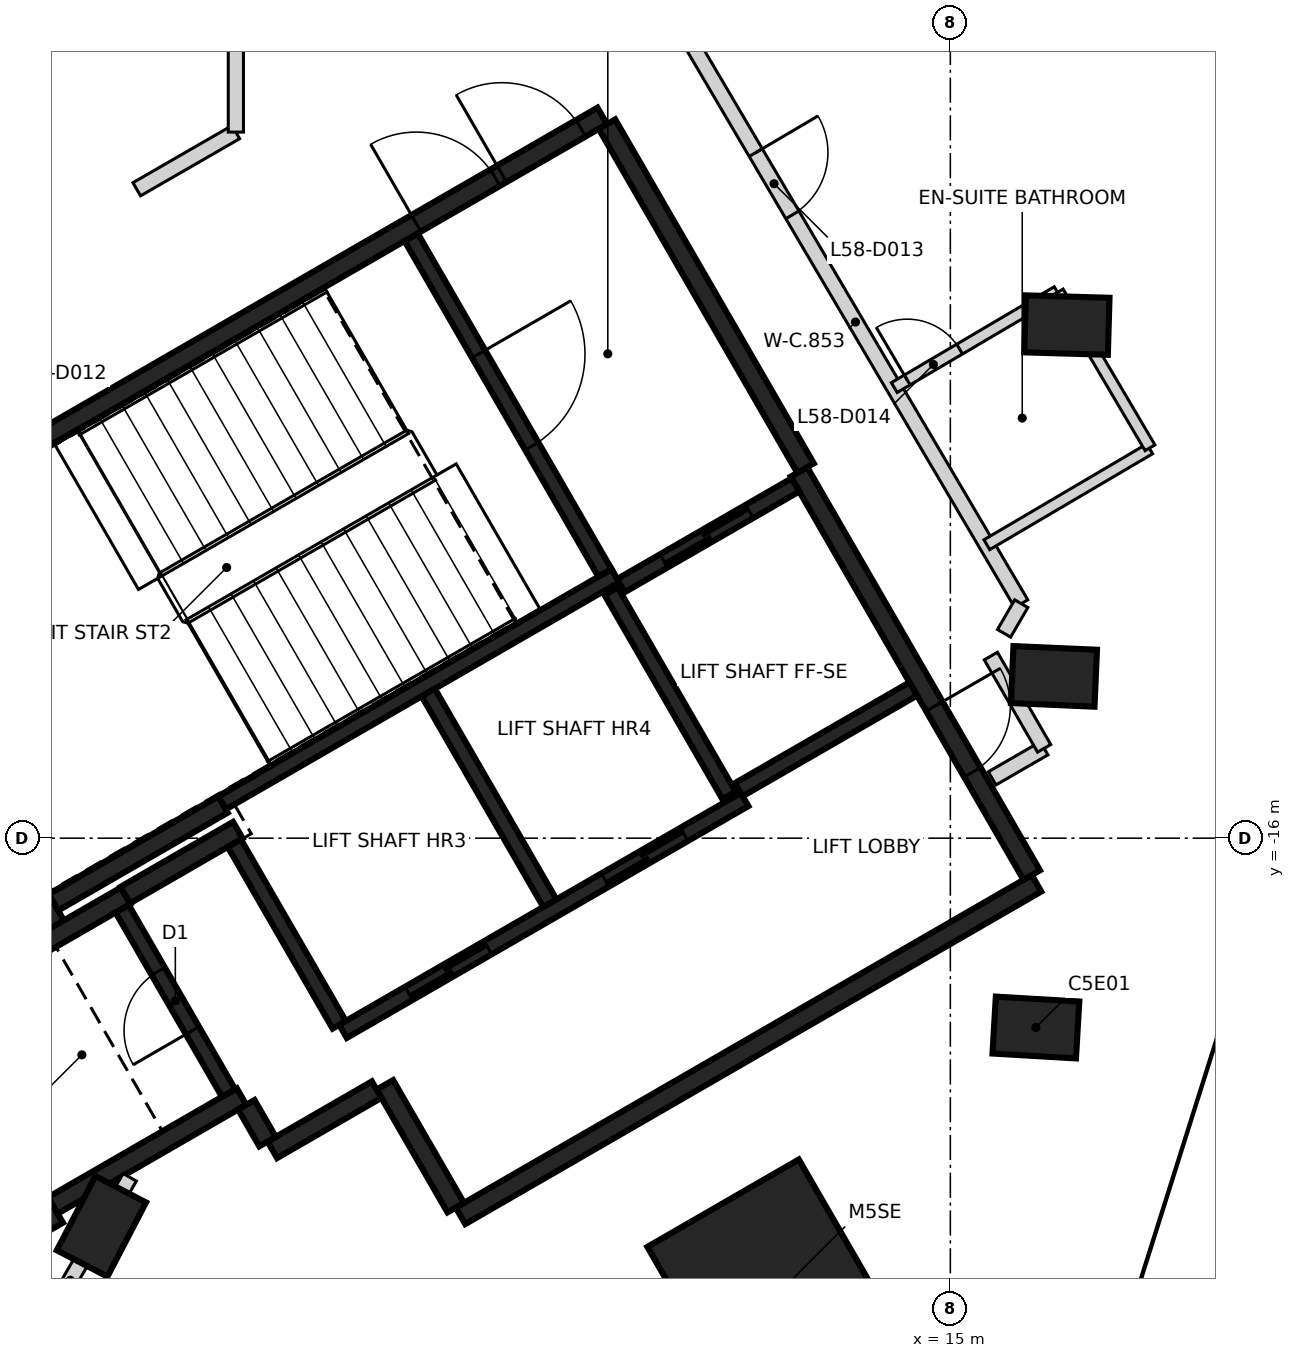
"""IFC4 building model, lengths in metres.
Left out: names, types, materials, properties, quantities, classifications, styles, units other than length and angle.
Written with IfcOpenShell. Run it as: python <this file> out.ifc"""

import sys

from ifc_helpers import new_model, si_unit, direction, frame, frame_2d, origin, origin_2d, place, context, subcontext, project, spatial, rectangle, extrude, element, fill, save


model = new_model("IFC4")
c1 = context("Model", 3, precision=1e-05, world=origin(), true_north=direction((0.0, 1.0)))
c2 = subcontext(c1, "Body", "Model", "MODEL_VIEW")
j1 = project(units=[si_unit("LENGTHUNIT", "METRE"), si_unit("PLANEANGLEUNIT", "RADIAN")], contexts=[c1])
p1 = place(None, origin())
s1 = spatial("IfcSite", under=j1, at=p1, CompositionType="ELEMENT")
p2 = place(p1, origin())
s2 = spatial("IfcBuilding", under=s1, at=p2, CompositionType="ELEMENT")
p3 = place(p2, frame((0.0, 0.0, 232.2)))
s3 = spatial("IfcBuildingStorey", under=s2, at=p3, CompositionType="ELEMENT", Elevation=232.2)
for number, where, z_axis, x_axis in (
    (1, (16.125, -18.491, -0.35), (0.0, 0.0, 1.0), (-0.998, 0.058, 0.0)),
    (2, (16.363, -13.872, -0.35), (0.0, 0.0, 1.0), (-0.999, 0.044, 0.0)),
    (3, (16.533, -9.25, -0.35), (0.0, 0.0, 1.0), (-1.0, 0.029, 0.0)),
    (4, (3.832, -21.107, -0.35), (0.0, 0.0, 1.0), (0.461, 0.887, 0.0)),
):
    element("IfcColumn", number, at=place(p3, frame(where, z_axis=z_axis, x_axis=x_axis)), inside=s3, PredefinedType="COLUMN", context=c2, shape_type="SweptSolid", body=[
        extrude(rectangle(XDim=1.1, YDim=0.75, at=origin_2d()), origin(), (0.0, 0.0, 1.0), 3.6),
    ])
p4 = place(p3, frame((12.71, -22.015, -0.35), z_axis=(0.0, 0.0, 1.0), x_axis=(-0.5, 0.866025403784, 0.0)))
e5 = element("IfcColumn", 5, at=p4, inside=s3, PredefinedType="COLUMN", context=c2, shape_type="SweptSolid", body=[
    extrude(rectangle(XDim=2.8, YDim=2.3, at=origin_2d()), origin(), (0.0, 0.0, 1.0), 3.6),
])
p5 = place(p3, frame((0.417, -12.273, 0.0), z_axis=(0.0, 0.0, 1.0), x_axis=(0.866021906294, 0.500006057782, 0.0)))
e6 = element("IfcWall", 6, at=p5, inside=s3, PredefinedType="SHEAR", context=c2, shape_type="SweptSolid", body=[
    extrude(rectangle(XDim=11.55, YDim=0.25, at=frame_2d((5.775, 0.0))), origin(), (0.0, 0.0, 1.0), 3.25),
])
p6 = place(p5, frame((10.025, 0.0, 0.0)))
e7 = element("IfcOpeningElement", 7, at=p6, cuts=e6, PredefinedType="OPENING", context=c2, shape_type="SweptSolid", body=[
    extrude(rectangle(XDim=1.2, YDim=2.1, at=frame_2d((0.6, 1.05))), frame((0.0, 0.135, 0.0), z_axis=(0.0, -1.0, 0.0), x_axis=(1.0, 0.0, 0.0)), (0.0, 0.0, 1.0), 0.27),
])
p7 = place(p5, frame((8.725, 0.0, 0.0)))
e8 = element("IfcOpeningElement", 8, at=p7, cuts=e6, PredefinedType="OPENING", context=c2, shape_type="SweptSolid", body=[
    extrude(rectangle(XDim=1.2, YDim=2.1, at=frame_2d((0.6, 1.05))), frame((0.0, 0.135, 0.0), z_axis=(0.0, -1.0, 0.0), x_axis=(1.0, 0.0, 0.0)), (0.0, 0.0, 1.0), 0.27),
])
p8 = place(p3, frame((16.133, -16.594, 0.0), z_axis=(0.0, 0.0, 1.0), x_axis=(-0.866022959057, -0.500004234368, 0.0)))
e9 = element("IfcWall", 9, at=p8, inside=s3, PredefinedType="SHEAR", context=c2, shape_type="SweptSolid", body=[
    extrude(rectangle(XDim=8.75, YDim=0.25, at=frame_2d((4.375, 0.0))), origin(), (0.0, 0.0, 1.0), 3.25),
])
p9 = place(p3, frame((13.008, -11.181, 0.0), z_axis=(0.0, 0.0, 1.0), x_axis=(0.500001955336, -0.866024274868, 0.0)))
e10 = element("IfcWall", 10, at=p9, inside=s3, PredefinedType="SHEAR", context=c2, shape_type="SweptSolid", body=[
    extrude(rectangle(XDim=6.125, YDim=0.25, at=frame_2d((3.062, 0.0))), origin(), (0.0, 0.0, 1.0), 3.25),
])
p10 = place(p9, frame((3.563, 0.0, 0.0)))
e11 = element("IfcOpeningElement", 11, at=p10, cuts=e10, PredefinedType="OPENING", context=c2, shape_type="SweptSolid", body=[
    extrude(rectangle(XDim=1.0, YDim=2.1, at=frame_2d((0.5, 1.05))), frame((0.0, 0.135, 0.0), z_axis=(0.0, -1.0, 0.0), x_axis=(1.0, 0.0, 0.0)), (0.0, 0.0, 1.0), 0.27),
])
p11 = place(p3, frame((3.235, -17.153, 0.0), z_axis=(0.0, 0.0, 1.0), x_axis=(-0.500008851346, 0.866020293397, 0.0)))
e12 = element("IfcWall", 12, at=p11, inside=s3, PredefinedType="SHEAR", context=c2, shape_type="SweptSolid", body=[
    extrude(rectangle(XDim=5.51, YDim=0.25, at=frame_2d((2.755, 0.0))), origin(), (0.0, 0.0, 1.0), 3.25),
])
p12 = place(p3, frame((10.483, -6.606, 0.0), z_axis=(0.0, 0.0, 1.0), x_axis=(0.49999885962, -0.866026062182, 0.0)))
e13 = element("IfcWall", 13, at=p12, inside=s3, PredefinedType="SHEAR", context=c2, shape_type="SweptSolid", body=[
    extrude(rectangle(XDim=5.225, YDim=0.25, at=frame_2d((2.612, 0.0))), origin(), (0.0, 0.0, 1.0), 3.25),
])
p13 = place(p3, frame((3.217, -21.122, 0.0), z_axis=(0.0, 0.0, 1.0), x_axis=(-0.499998874531, 0.866026053573, 0.0)))
e14 = element("IfcWall", 14, at=p13, inside=s3, PredefinedType="SHEAR", context=c2, shape_type="SweptSolid", body=[
    extrude(rectangle(XDim=3.313, YDim=0.25, at=frame_2d((1.656, 0.0))), origin(), (0.0, 0.0, 1.0), 3.25),
])
p14 = place(p3, frame((1.669, -18.19, 0.0), z_axis=(0.0, 0.0, 1.0), x_axis=(0.866042235819, 0.499970844928, 0.0)))
e15 = element("IfcWall", 15, at=p14, inside=s3, PredefinedType="SHEAR", context=c2, shape_type="SweptSolid", body=[
    extrude(rectangle(XDim=2.865, YDim=0.25, at=frame_2d((1.432, 0.0))), origin(), (0.0, 0.0, 1.0), 3.25),
])
p15 = place(p3, frame((5.675, -19.399, 0.0), z_axis=(0.0, 0.0, 1.0), x_axis=(-0.866026637627, -0.499997862916, 0.0)))
e16 = element("IfcWall", 16, at=p15, inside=s3, PredefinedType="SHEAR", context=c2, shape_type="SweptSolid", body=[
    extrude(rectangle(XDim=2.865, YDim=0.25, at=frame_2d((1.432, 0.0))), origin(), (0.0, 0.0, 1.0), 3.25),
])
p16 = place(p3, frame((5.431, -15.556, 0.0), z_axis=(0.0, 0.0, 1.0), x_axis=(-0.866022940537, -0.500004266446, 0.0)))
e17 = element("IfcWall", 17, at=p16, inside=s3, PredefinedType="SHEAR", context=c2, shape_type="SweptSolid", body=[
    extrude(rectangle(XDim=2.575, YDim=0.25, at=frame_2d((1.287, 0.0))), origin(), (0.0, 0.0, 1.0), 3.25),
])
p17 = place(p3, frame((8.493, -20.86, 0.0), z_axis=(0.0, 0.0, 1.0), x_axis=(-0.500039802285, 0.866002422705, 0.0)))
e18 = element("IfcWall", 18, at=p17, inside=s3, PredefinedType="SHEAR", context=c2, shape_type="SweptSolid", body=[
    extrude(rectangle(XDim=1.865, YDim=0.25, at=frame_2d((0.932, 0.0))), origin(), (0.0, 0.0, 1.0), 3.25),
])
p18 = place(p3, frame((4.145, -16.749, 0.0), z_axis=(0.0, 0.0, 1.0), x_axis=(0.866038183914, 0.499977863513, 0.0)))
e19 = element("IfcWall", 19, at=p18, inside=s3, PredefinedType="SHEAR", context=c2, shape_type="SweptSolid", body=[
    extrude(rectangle(XDim=1.71, YDim=0.25, at=frame_2d((0.855, 0.0))), origin(), (0.0, 0.0, 1.0), 3.25),
])
p19 = place(p3, frame((7.452, -19.308, 0.0), z_axis=(0.0, 0.0, 1.0), x_axis=(-0.866044474677, -0.49996696679, 0.0)))
e20 = element("IfcWall", 20, at=p19, inside=s3, PredefinedType="SHEAR", context=c2, shape_type="SweptSolid", body=[
    extrude(rectangle(XDim=1.584, YDim=0.25, at=frame_2d((0.792, 0.0))), origin(), (0.0, 0.0, 1.0), 3.25),
])
p20 = place(p3, frame((6.017, -19.992, 0.0), z_axis=(0.0, 0.0, 1.0), x_axis=(-0.500364886717, 0.865814633822, 0.0)))
e21 = element("IfcWall", 21, at=p20, inside=s3, PredefinedType="SHEAR", context=c2, shape_type="SweptSolid", body=[
    extrude(rectangle(XDim=0.559, YDim=0.25, at=frame_2d((0.28, 0.0))), origin(), (0.0, 0.0, 1.0), 3.25),
])
p21 = place(p3, frame((5.419, -15.534, 0.0), z_axis=(0.0, 0.0, 1.0), x_axis=(0.866029065029, 0.499993658486, 0.0)))
e22 = element("IfcWall", 22, at=p21, inside=s3, PredefinedType="SHEAR", context=c2, shape_type="SweptSolid", body=[
    extrude(rectangle(XDim=5.974, YDim=0.2, at=frame_2d((2.987, 0.0))), origin(), (0.0, 0.0, 1.0), 3.25),
])
p22 = place(p3, frame((7.01, -18.542, 0.0), z_axis=(0.0, 0.0, 1.0), x_axis=(0.866030299012, 0.499991521122, 0.0)))
e23 = element("IfcWall", 23, at=p22, inside=s3, PredefinedType="SHEAR", context=c2, shape_type="SweptSolid", body=[
    extrude(rectangle(XDim=6.1, YDim=0.2, at=frame_2d((3.05, 0.0))), origin(), (0.0, 0.0, 1.0), 3.25),
])
p23 = place(p22, frame((1.0, 0.0, 0.0)))
e24 = element("IfcOpeningElement", 24, at=p23, cuts=e23, PredefinedType="OPENING", context=c2, shape_type="SweptSolid", body=[
    extrude(rectangle(XDim=1.2, YDim=2.1, at=frame_2d((0.6, 1.05))), frame((0.0, 0.11, 0.0), z_axis=(0.0, -1.0, 0.0), x_axis=(1.0, 0.0, 0.0)), (0.0, 0.0, 1.0), 0.22),
])
p24 = place(p22, frame((3.982, 0.0, 0.0)))
e25 = element("IfcOpeningElement", 25, at=p24, cuts=e23, PredefinedType="OPENING", context=c2, shape_type="SweptSolid", body=[
    extrude(rectangle(XDim=1.2, YDim=2.1, at=frame_2d((0.6, 1.05))), frame((0.0, 0.11, 0.0), z_axis=(0.0, -1.0, 0.0), x_axis=(1.0, 0.0, 0.0)), (0.0, 0.0, 1.0), 0.22),
])
p25 = place(p3, frame((7.906, -8.094, 0.0), z_axis=(0.0, 0.0, 1.0), x_axis=(0.500027839223, -0.866009330205, 0.0)))
e26 = element("IfcWall", 26, at=p25, inside=s3, PredefinedType="SHEAR", context=c2, shape_type="SweptSolid", body=[
    extrude(rectangle(XDim=5.098, YDim=0.2, at=frame_2d((2.549, 0.0))), origin(), (0.0, 0.0, 1.0), 3.25),
])
p26 = place(p25, frame((1.774, 0.0, 0.0)))
e27 = element("IfcOpeningElement", 27, at=p26, cuts=e26, PredefinedType="OPENING", context=c2, shape_type="SweptSolid", body=[
    extrude(rectangle(XDim=1.4, YDim=2.1, at=frame_2d((0.7, 1.05))), frame((0.0, 0.11, 0.0), z_axis=(0.0, -1.0, 0.0), x_axis=(1.0, 0.0, 0.0)), (0.0, 0.0, 1.0), 0.22),
])
p27 = place(p3, frame((8.132, -14.084, 0.0), z_axis=(0.0, 0.0, 1.0), x_axis=(0.499997778408, -0.866026686418, 0.0)))
e28 = element("IfcWall", 28, at=p27, inside=s3, PredefinedType="SHEAR", context=c2, shape_type="SweptSolid", body=[
    extrude(rectangle(XDim=3.198, YDim=0.2, at=frame_2d((1.599, 0.0))), origin(), (0.0, 0.0, 1.0), 3.25),
])
p28 = place(p3, frame((5.503, -19.352, 0.0), z_axis=(0.0, 0.0, 1.0), x_axis=(-0.499986818241, 0.866033014143, 0.0)))
e29 = element("IfcWall", 29, at=p28, inside=s3, PredefinedType="SHEAR", context=c2, shape_type="SweptSolid", body=[
    extrude(rectangle(XDim=2.798, YDim=0.2, at=frame_2d((1.399, 0.0))), origin(), (0.0, 0.0, 1.0), 3.25),
])
p29 = place(p28, frame((0.949, 0.0, 0.0)))
e30 = element("IfcOpeningElement", 30, at=p29, cuts=e29, PredefinedType="OPENING", context=c2, shape_type="SweptSolid", body=[
    extrude(rectangle(XDim=0.9, YDim=2.1, at=frame_2d((0.45, 1.05))), frame((0.0, 0.11, 0.0), z_axis=(0.0, -1.0, 0.0), x_axis=(1.0, 0.0, 0.0)), (0.0, 0.0, 1.0), 0.22),
])
p30 = place(p3, frame((6.96, -18.455, 0.0), z_axis=(0.0, 0.0, 1.0), x_axis=(-0.499926705758, 0.866067716099, 0.0)))
e31 = element("IfcWall", 31, at=p30, inside=s3, PredefinedType="SHEAR", context=c2, shape_type="SweptSolid", body=[
    extrude(rectangle(XDim=2.759, YDim=0.2, at=frame_2d((1.38, 0.0))), origin(), (0.0, 0.0, 1.0), 3.25),
])
p31 = place(p3, frame((12.088, -15.437, 0.0), z_axis=(0.0, 0.0, 1.0), x_axis=(-0.500026960575, 0.86600983753, 0.0)))
e32 = element("IfcWall", 32, at=p31, inside=s3, PredefinedType="SHEAR", context=c2, shape_type="SweptSolid", body=[
    extrude(rectangle(XDim=3.1, YDim=0.2, at=frame_2d((1.55, 0.0))), origin(), (0.0, 0.0, 1.0), 3.25),
])
p32 = place(p3, frame((10.666, -12.678, 0.0), z_axis=(0.0, 0.0, 1.0), x_axis=(0.866018407898, 0.500012117035, 0.0)))
e33 = element("IfcWall", 33, at=p32, inside=s3, PredefinedType="SHEAR", context=c2, shape_type="SweptSolid", body=[
    extrude(rectangle(XDim=2.651, YDim=0.2, at=frame_2d((1.325, 0.0))), origin(), (0.0, 0.0, 1.0), 3.25),
])
p33 = place(p32, frame((0.652, 0.0, 0.0)))
e34 = element("IfcOpeningElement", 34, at=p33, cuts=e33, PredefinedType="OPENING", context=c2, shape_type="SweptSolid", body=[
    extrude(rectangle(XDim=1.3, YDim=2.1, at=frame_2d((0.65, 1.05))), frame((0.0, 0.11, 0.0), z_axis=(0.0, -1.0, 0.0), x_axis=(1.0, 0.0, 0.0)), (0.0, 0.0, 1.0), 0.22),
])
p34 = place(p3, frame((14.512, -14.037, 0.0), z_axis=(0.0, 0.0, 1.0), x_axis=(-0.866018407898, -0.500012117035, 0.0)))
e35 = element("IfcWall", 35, at=p34, inside=s3, PredefinedType="SHEAR", context=c2, shape_type="SweptSolid", body=[
    extrude(rectangle(XDim=2.651, YDim=0.2, at=frame_2d((1.325, 0.0))), origin(), (0.0, 0.0, 1.0), 3.25),
])
p35 = place(p3, frame((4.296, -7.463, 0.0), z_axis=(0.0, 0.0, 1.0), x_axis=(0.86632054743, 0.499488447414, 0.0)))
e36 = element("IfcWall", 36, at=p35, inside=s3, PredefinedType="PARTITIONING", context=c2, shape_type="SweptSolid", body=[
    extrude(rectangle(XDim=1.505, YDim=0.2, at=frame_2d((0.753, 0.0))), origin(), (0.0, 0.0, 1.0), 3.25),
])
p36 = place(p3, frame((5.6, -6.711, 0.0), z_axis=(0.0, 0.0, 1.0), x_axis=(0.0, 1.0, 0.0)))
e37 = element("IfcWall", 37, at=p36, inside=s3, PredefinedType="PARTITIONING", context=c2, shape_type="SweptSolid", body=[
    extrude(rectangle(XDim=13.422, YDim=0.2, at=frame_2d((6.711, 0.0))), origin(), (0.0, 0.0, 1.0), 3.25),
])
p37 = place(p36, frame((2.912, 0.0, 0.0)))
e38 = element("IfcOpeningElement", 38, at=p37, cuts=e37, PredefinedType="OPENING", context=c2, shape_type="SweptSolid", body=[
    extrude(rectangle(XDim=0.9, YDim=2.1, at=frame_2d((0.45, 1.05))), frame((0.0, 0.11, 0.0), z_axis=(0.0, -1.0, 0.0), x_axis=(1.0, 0.0, 0.0)), (0.0, 0.0, 1.0), 0.22),
])
p38 = place(p36, frame((9.611, 0.0, 0.0)))
e39 = element("IfcOpeningElement", 39, at=p38, cuts=e37, PredefinedType="OPENING", context=c2, shape_type="SweptSolid", body=[
    extrude(rectangle(XDim=0.9, YDim=2.1, at=frame_2d((0.45, 1.05))), frame((0.0, 0.11, 0.0), z_axis=(0.0, -1.0, 0.0), x_axis=(1.0, 0.0, 0.0)), (0.0, 0.0, 1.0), 0.22),
])
p39 = place(p3, frame((11.571, -5.505, 0.0), z_axis=(0.0, 0.0, 1.0), x_axis=(0.507291838928, -0.861774326699, 0.0)))
e40 = element("IfcWall", 40, at=p39, inside=s3, PredefinedType="PARTITIONING", context=c2, shape_type="SweptSolid", body=[
    extrude(rectangle(XDim=8.599, YDim=0.2, at=frame_2d((4.299, 0.0))), origin(), (0.0, 0.0, 1.0), 3.25),
])
p40 = place(p39, frame((1.712, 0.0, 0.0)))
e41 = element("IfcOpeningElement", 41, at=p40, cuts=e40, PredefinedType="OPENING", context=c2, shape_type="SweptSolid", body=[
    extrude(rectangle(XDim=0.95, YDim=2.1, at=frame_2d((0.475, 1.05))), frame((0.0, 0.11, 0.0), z_axis=(0.0, -1.0, 0.0), x_axis=(1.0, 0.0, 0.0)), (0.0, 0.0, 1.0), 0.22),
])
p41 = place(p3, frame((15.55, -15.213, 0.0), z_axis=(0.0, 0.0, 1.0), x_axis=(0.865989998118, 0.500061319399, 0.0)))
e42 = element("IfcWall", 42, at=p41, inside=s3, PredefinedType="PARTITIONING", context=c2, shape_type="SweptSolid", body=[
    extrude(rectangle(XDim=0.79, YDim=0.2, at=frame_2d((0.395, 0.0))), origin(), (0.0, 0.0, 1.0), 2.35),
])
p42 = place(p3, frame((15.933, -12.915, 0.0), z_axis=(0.0, 0.0, 1.0), x_axis=(-0.502017930819, -0.864857211993, 0.0)))
e43 = element("IfcWall", 43, at=p42, inside=s3, PredefinedType="PARTITIONING", context=c2, shape_type="SweptSolid", body=[
    extrude(rectangle(XDim=0.451, YDim=0.2, at=frame_2d((0.226, 0.0))), origin(), (0.0, 0.0, 1.0), 3.25),
])
p43 = place(p3, frame((15.533, -13.604, 0.0), z_axis=(0.0, 0.0, 1.0), x_axis=(0.499978724804, -0.866037686676, 0.0)))
e44 = element("IfcWall", 44, at=p43, inside=s3, PredefinedType="PARTITIONING", context=c2, shape_type="SweptSolid", body=[
    extrude(rectangle(XDim=1.402, YDim=0.2, at=frame_2d((0.701, 0.0))), origin(), (0.0, 0.0, 1.0), 2.35),
])
p44 = place(p3, frame((2.64, -23.17, 0.0), z_axis=(0.0, 0.0, 1.0), x_axis=(0.500017489778, 0.866015305821, 0.0)))
e45 = element("IfcWall", 45, at=p44, inside=s3, PredefinedType="PARTITIONING", context=c2, shape_type="SweptSolid", body=[
    extrude(rectangle(XDim=3.128, YDim=0.2, at=frame_2d((1.564, 0.0))), origin(), (0.0, 0.0, 1.0), 3.25),
])
p45 = place(p3, frame((14.262, -10.072, 0.0), z_axis=(0.0, 0.0, 1.0), x_axis=(0.861699433364, 0.507419044322, 0.0)))
e46 = element("IfcWall", 46, at=p45, inside=s3, PredefinedType="PARTITIONING", context=c2, shape_type="SweptSolid", body=[
    extrude(rectangle(XDim=2.487, YDim=0.15, at=frame_2d((1.244, 0.0))), origin(), (0.0, 0.0, 1.0), 3.25),
])
p46 = place(p45, frame((0.198, 0.0, 0.0)))
e47 = element("IfcOpeningElement", 47, at=p46, cuts=e46, PredefinedType="OPENING", context=c2, shape_type="SweptSolid", body=[
    extrude(rectangle(XDim=0.8, YDim=2.1, at=frame_2d((0.4, 1.05))), frame((0.0, 0.085, 0.0), z_axis=(0.0, -1.0, 0.0), x_axis=(1.0, 0.0, 0.0)), (0.0, 0.0, 1.0), 0.17),
])
p47 = place(p3, frame((15.48, -12.139, 0.0), z_axis=(0.0, 0.0, 1.0), x_axis=(0.86187110735, 0.507127394562, 0.0)))
e48 = element("IfcWall", 48, at=p47, inside=s3, PredefinedType="PARTITIONING", context=c2, shape_type="SweptSolid", body=[
    extrude(rectangle(XDim=2.487, YDim=0.15, at=frame_2d((1.243, 0.0))), origin(), (0.0, 0.0, 1.0), 2.35),
])
p48 = place(p3, frame((16.419, -8.814, 0.0), z_axis=(0.0, 0.0, 1.0), x_axis=(0.507674628474, -0.861548879405, 0.0)))
e49 = element("IfcWall", 49, at=p48, inside=s3, PredefinedType="PARTITIONING", context=c2, shape_type="SweptSolid", body=[
    extrude(rectangle(XDim=2.379, YDim=0.15, at=frame_2d((1.19, 0.0))), origin(), (0.0, 0.0, 1.0), 3.25),
])
p49 = place(p33, origin())
e50 = element("IfcDoor", 50, at=p49, inside=s3, OperationType="SLIDING_TO_LEFT", PredefinedType="DOOR", context=c2, shape_type="SweptSolid", body=[
    extrude(rectangle(XDim=1.3, YDim=2.1, at=frame_2d((0.65, 1.05))), frame((0.0, 0.025, 0.0), z_axis=(0.0, -1.0, 0.0), x_axis=(1.0, 0.0, 0.0)), (0.0, 0.0, 1.0), 0.05),
])
fill(e34, e50)
p50 = place(p23, origin())
e51 = element("IfcDoor", 51, at=p50, inside=s3, OperationType="DOUBLE_DOOR_SLIDING", PredefinedType="DOOR", context=c2, shape_type="SweptSolid", body=[
    extrude(rectangle(XDim=1.2, YDim=2.1, at=frame_2d((0.6, 1.05))), frame((0.0, 0.025, 0.0), z_axis=(0.0, -1.0, 0.0), x_axis=(1.0, 0.0, 0.0)), (0.0, 0.0, 1.0), 0.05),
])
fill(e24, e51)
p51 = place(p24, origin())
e52 = element("IfcDoor", 52, at=p51, inside=s3, OperationType="DOUBLE_DOOR_SLIDING", PredefinedType="DOOR", context=c2, shape_type="SweptSolid", body=[
    extrude(rectangle(XDim=1.2, YDim=2.1, at=frame_2d((0.6, 1.05))), frame((0.0, 0.025, 0.0), z_axis=(0.0, -1.0, 0.0), x_axis=(1.0, 0.0, 0.0)), (0.0, 0.0, 1.0), 0.05),
])
fill(e25, e52)
p52 = place(p10, origin())
e53 = element("IfcDoor", 53, at=p52, inside=s3, OperationType="SINGLE_SWING_LEFT", PredefinedType="DOOR", context=c2, shape_type="SweptSolid", body=[
    extrude(rectangle(XDim=1.0, YDim=2.1, at=frame_2d((0.5, 1.05))), frame((0.0, 0.025, 0.0), z_axis=(0.0, -1.0, 0.0), x_axis=(1.0, 0.0, 0.0)), (0.0, 0.0, 1.0), 0.05),
])
fill(e11, e53)
p53 = place(p6, origin())
e54 = element("IfcDoor", 54, at=p53, inside=s3, OperationType="SINGLE_SWING_LEFT", PredefinedType="DOOR", context=c2, shape_type="SweptSolid", body=[
    extrude(rectangle(XDim=1.2, YDim=2.1, at=frame_2d((0.6, 1.05))), frame((0.0, 0.025, 0.0), z_axis=(0.0, -1.0, 0.0), x_axis=(1.0, 0.0, 0.0)), (0.0, 0.0, 1.0), 0.05),
])
fill(e7, e54)
p54 = place(p7, origin())
e55 = element("IfcDoor", 55, at=p54, inside=s3, OperationType="SINGLE_SWING_RIGHT", PredefinedType="DOOR", context=c2, shape_type="SweptSolid", body=[
    extrude(rectangle(XDim=1.2, YDim=2.1, at=frame_2d((0.6, 1.05))), frame((0.0, 0.025, 0.0), z_axis=(0.0, -1.0, 0.0), x_axis=(1.0, 0.0, 0.0)), (0.0, 0.0, 1.0), 0.05),
])
fill(e8, e55)
p55 = place(p26, origin())
e56 = element("IfcDoor", 56, at=p55, inside=s3, OperationType="SINGLE_SWING_LEFT", PredefinedType="DOOR", context=c2, shape_type="SweptSolid", body=[
    extrude(rectangle(XDim=1.4, YDim=2.1, at=frame_2d((0.7, 1.05))), frame((0.0, 0.025, 0.0), z_axis=(0.0, -1.0, 0.0), x_axis=(1.0, 0.0, 0.0)), (0.0, 0.0, 1.0), 0.05),
])
fill(e27, e56)
p56 = place(p29, origin())
e57 = element("IfcDoor", 57, at=p56, inside=s3, OperationType="SINGLE_SWING_RIGHT", PredefinedType="DOOR", context=c2, shape_type="SweptSolid", body=[
    extrude(rectangle(XDim=0.9, YDim=2.1, at=frame_2d((0.45, 1.05))), frame((0.0, 0.025, 0.0), z_axis=(0.0, -1.0, 0.0), x_axis=(1.0, 0.0, 0.0)), (0.0, 0.0, 1.0), 0.05),
])
fill(e30, e57)
p57 = place(p40, origin())
e58 = element("IfcDoor", 58, at=p57, inside=s3, OperationType="SINGLE_SWING_LEFT", PredefinedType="DOOR", context=c2, shape_type="SweptSolid", body=[
    extrude(rectangle(XDim=0.95, YDim=2.1, at=frame_2d((0.475, 1.05))), frame((0.0, 0.025, 0.0), z_axis=(0.0, -1.0, 0.0), x_axis=(1.0, 0.0, 0.0)), (0.0, 0.0, 1.0), 0.05),
])
fill(e41, e58)
p58 = place(p46, frame((0.8, 0.0, 0.0), z_axis=(0.0, 0.0, 1.0), x_axis=(-1.0, 0.0, 0.0)))
e59 = element("IfcDoor", 59, at=p58, inside=s3, OperationType="SINGLE_SWING_LEFT", PredefinedType="DOOR", context=c2, shape_type="SweptSolid", body=[
    extrude(rectangle(XDim=0.8, YDim=2.1, at=frame_2d((0.4, 1.05))), frame((0.0, 0.025, 0.0), z_axis=(0.0, -1.0, 0.0), x_axis=(1.0, 0.0, 0.0)), (0.0, 0.0, 1.0), 0.05),
])
fill(e47, e59)
save(model, sys.argv[1])
